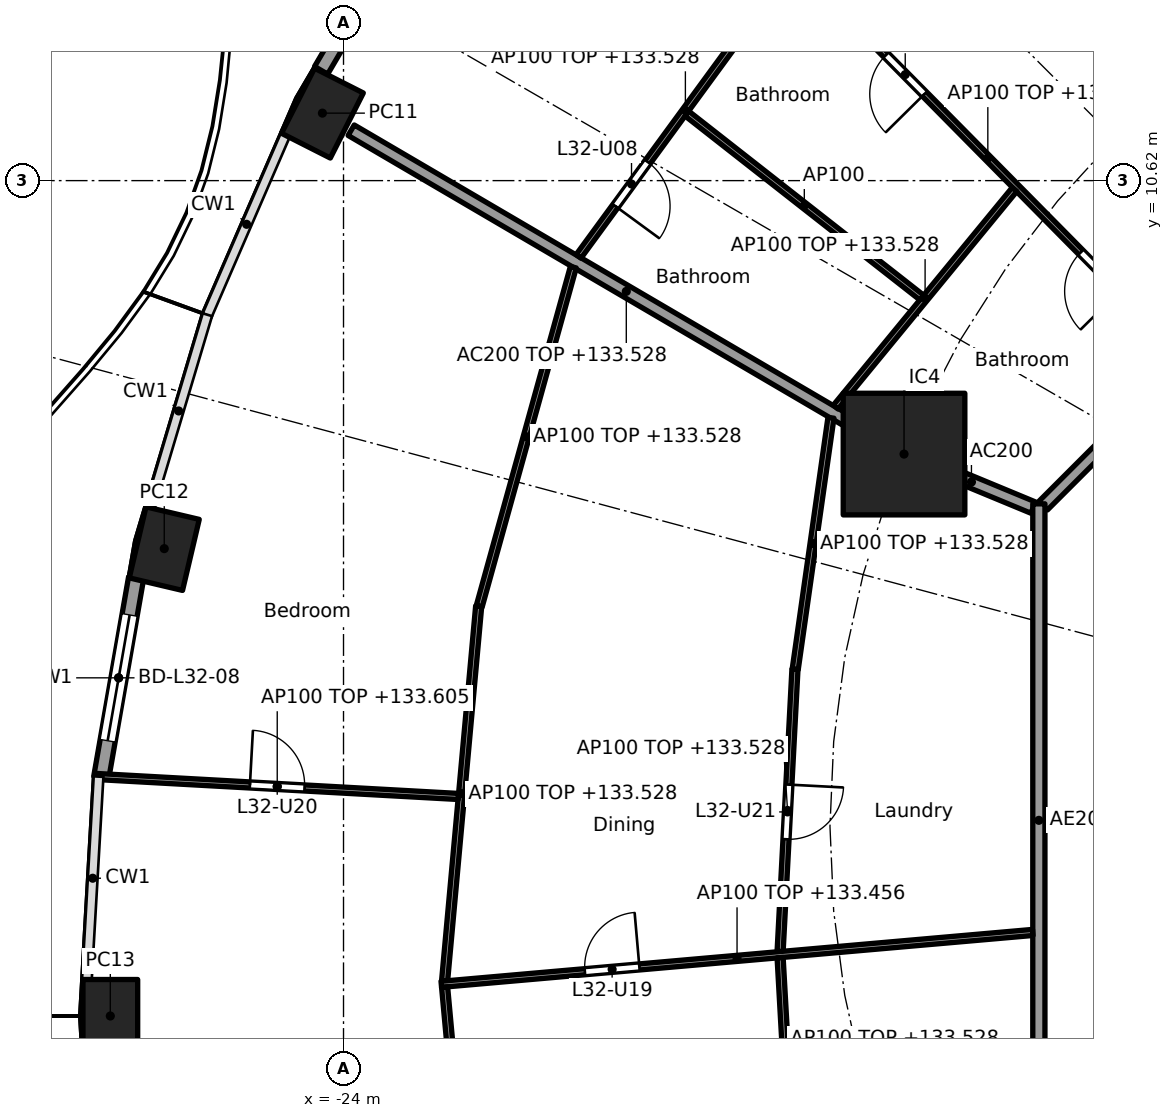
"""IFC4 building model, lengths in metres.
Left out: names, types, materials, properties, quantities, classifications, styles, units other than length and angle.
Written with IfcOpenShell. Run it as: python <this file> out.ifc"""

import sys

from ifc_helpers import new_model, si_unit, direction, frame, frame_2d, origin, origin_2d, place, context, subcontext, project, spatial, rectangle, hollow_rectangle, extrude, element, fill, save


model = new_model("IFC4")
c1 = context("Model", 3, precision=1e-05, world=origin(), true_north=direction((0.0, 1.0)))
c2 = subcontext(c1, "Body", "Model", "MODEL_VIEW")
j1 = project(units=[si_unit("LENGTHUNIT", "METRE"), si_unit("PLANEANGLEUNIT", "RADIAN")], contexts=[c1])
p1 = place(None, origin())
s1 = spatial("IfcSite", under=j1, at=p1, CompositionType="ELEMENT")
p2 = place(p1, origin())
s2 = spatial("IfcBuilding", under=s1, at=p2, CompositionType="ELEMENT")
p3 = place(p2, frame((0.0, 0.0, 130.7)))
s3 = spatial("IfcBuildingStorey", under=s2, at=p3, CompositionType="ELEMENT", Elevation=130.7)
for number, where, z_axis, x_axis in (
    (1, (-24.347, 11.73, 0.0), (0.0, 0.0, 1.0), (-0.452, -0.892, 0.0)),
    (2, (-26.948, 4.568, 0.0), (0.0, 0.0, 1.0), (-0.229, -0.973, 0.0)),
    (3, (-27.835, -3.118, 0.0), (0.0, 0.0, 1.0), (0.0, -1.0, 0.0)),
):
    element("IfcColumn", number, at=place(p3, frame(where, z_axis=z_axis, x_axis=x_axis)), inside=s3, PredefinedType="COLUMN", context=c2, shape_type="SweptSolid", body=[
        extrude(hollow_rectangle(XDim=1.2, YDim=0.9, WallThickness=0.04, at=origin_2d()), origin(), (0.0, 0.0, 1.0), 3.7),
    ])
p4 = place(p3, frame((-14.782, 6.123, 0.0), z_axis=(0.0, 0.0, 1.0), x_axis=(1.0, 0.0, 0.0)))
e4 = element("IfcColumn", 4, at=p4, inside=s3, PredefinedType="COLUMN", context=c2, shape_type="SweptSolid", body=[
    extrude(rectangle(XDim=2.0, YDim=2.0, at=origin_2d()), origin(), (0.0, 0.0, 1.0), 3.7),
])
p5 = place(p3, frame((-24.368, 12.434, 0.0), z_axis=(0.0, 0.0, 1.0), x_axis=(0.506314982873, 0.862348617508, 0.0)))
e5 = element("IfcWall", 5, at=p5, inside=s3, PredefinedType="SOLIDWALL", context=c2, shape_type="SweptSolid", body=[
    extrude(rectangle(XDim=3.208, YDim=0.25, at=frame_2d((1.604, 0.0))), origin(), (0.0, 0.0, 1.0), 3.44),
])
p6 = place(p5, frame((0.554, 0.0, 0.0)))
e6 = element("IfcOpeningElement", 6, at=p6, cuts=e5, PredefinedType="OPENING", context=c2, shape_type="SweptSolid", body=[
    extrude(rectangle(XDim=2.1, YDim=2.4, at=frame_2d((1.05, 1.2))), frame((0.0, 0.135, 0.0), z_axis=(0.0, -1.0, 0.0), x_axis=(1.0, 0.0, 0.0)), (0.0, 0.0, 1.0), 0.27),
])
p7 = place(p3, frame((-27.985, 0.802, 0.0), z_axis=(0.0, 0.0, 1.0), x_axis=(0.172163521006, 0.985068384446, 0.0)))
e7 = element("IfcWall", 7, at=p7, inside=s3, PredefinedType="SOLIDWALL", context=c2, shape_type="SweptSolid", body=[
    extrude(rectangle(XDim=3.333, YDim=0.25, at=frame_2d((1.666, 0.0))), origin(), (0.0, 0.0, 1.0), 3.44),
])
p8 = place(p7, frame((0.616, 0.0, 0.0)))
e8 = element("IfcOpeningElement", 8, at=p8, cuts=e7, PredefinedType="OPENING", context=c2, shape_type="SweptSolid", body=[
    extrude(rectangle(XDim=2.1, YDim=2.4, at=frame_2d((1.05, 1.2))), frame((0.0, 0.135, 0.0), z_axis=(0.0, -1.0, 0.0), x_axis=(1.0, 0.0, 0.0)), (0.0, 0.0, 1.0), 0.27),
])
p9 = place(p3, frame((-12.657, 5.243, 0.0), z_axis=(0.0, 0.0, 1.0), x_axis=(-0.923869415315, 0.382707856524, 0.0)))
e9 = element("IfcWall", 9, at=p9, inside=s3, PredefinedType="PARTITIONING", context=c2, shape_type="SweptSolid", body=[
    extrude(rectangle(XDim=2.2, YDim=0.2, at=frame_2d((1.1, 0.0))), origin(), (0.0, 0.0, 1.0), 3.44),
])
p10 = place(p3, frame((-14.825, 6.148, 0.0), z_axis=(0.0, 0.0, 1.0), x_axis=(-0.862852031662, 0.505456597006, 0.0)))
e10 = element("IfcWall", 10, at=p10, inside=s3, PredefinedType="PARTITIONING", context=c2, shape_type="SweptSolid", body=[
    extrude(rectangle(XDim=10.487, YDim=0.2, at=frame_2d((5.244, 0.0))), origin(), (0.0, 0.0, 1.0), 2.828),
])
p11 = place(p3, frame((-5.275, 12.494, 0.0), z_axis=(0.0, 0.0, 1.0), x_axis=(-0.707106781187, -0.707106781187, 0.0)))
e11 = element("IfcWall", 11, at=p11, inside=s3, PredefinedType="PARTITIONING", context=c2, shape_type="SweptSolid", body=[
    extrude(rectangle(XDim=10.209, YDim=0.2, at=frame_2d((5.104, 0.0))), origin(), (0.0, 0.0, 1.0), 3.44),
])
p12 = place(p11, frame((4.604, 0.0, 0.0)))
e12 = element("IfcOpeningElement", 12, at=p12, cuts=e11, PredefinedType="OPENING", context=c2, shape_type="SweptSolid", body=[
    extrude(rectangle(XDim=1.0, YDim=2.1, at=frame_2d((0.5, 1.05))), frame((0.0, 0.11, 0.0), z_axis=(0.0, -1.0, 0.0), x_axis=(1.0, 0.0, 0.0)), (0.0, 0.0, 1.0), 0.22),
])
p13 = place(p3, frame((-12.565, 5.304, 0.0), z_axis=(0.0, 0.0, 1.0), x_axis=(0.0, -1.0, 0.0)))
e13 = element("IfcWall", 13, at=p13, inside=s3, PredefinedType="PARTITIONING", context=c2, shape_type="SweptSolid", body=[
    extrude(rectangle(XDim=10.409, YDim=0.2, at=frame_2d((5.205, 0.0))), origin(), (0.0, 0.0, 1.0), 3.44),
])
p14 = place(p3, frame((-7.708, 10.198, 0.0), z_axis=(0.0, 0.0, 1.0), x_axis=(-0.497449462689, 0.867492957937, 0.0)))
e14 = element("IfcWall", 14, at=p14, inside=s3, PredefinedType="PARTITIONING", context=c2, shape_type="SweptSolid", body=[
    extrude(rectangle(XDim=9.185, YDim=0.1, at=frame_2d((4.592, 0.0))), origin(), (0.0, 0.0, 1.0), 2.756),
])
p15 = place(p14, frame((1.511, 0.0, 0.0)))
e15 = element("IfcOpeningElement", 15, at=p15, cuts=e14, PredefinedType="OPENING", context=c2, shape_type="SweptSolid", body=[
    extrude(rectangle(XDim=0.9, YDim=2.1, at=frame_2d((0.45, 1.05))), frame((0.0, 0.06, 0.0), z_axis=(0.0, -1.0, 0.0), x_axis=(1.0, 0.0, 0.0)), (0.0, 0.0, 1.0), 0.12),
])
p16 = place(p14, frame((6.078, 0.0, 0.0)))
e16 = element("IfcOpeningElement", 16, at=p16, cuts=e14, PredefinedType="OPENING", context=c2, shape_type="SweptSolid", body=[
    extrude(rectangle(XDim=0.9, YDim=2.1, at=frame_2d((0.45, 1.05))), frame((0.0, 0.06, 0.0), z_axis=(0.0, -1.0, 0.0), x_axis=(1.0, 0.0, 0.0)), (0.0, 0.0, 1.0), 0.12),
])
p17 = place(p3, frame((-10.182, 7.729, 0.0), z_axis=(0.0, 0.0, 1.0), x_axis=(-0.702927211734, 0.711261790766, 0.0)))
e17 = element("IfcWall", 17, at=p17, inside=s3, PredefinedType="PARTITIONING", context=c2, shape_type="SweptSolid", body=[
    extrude(rectangle(XDim=9.168, YDim=0.1, at=frame_2d((4.584, 0.0))), origin(), (0.0, 0.0, 1.0), 2.756),
])
p18 = place(p17, frame((1.507, 0.0, 0.0)))
e18 = element("IfcOpeningElement", 18, at=p18, cuts=e17, PredefinedType="OPENING", context=c2, shape_type="SweptSolid", body=[
    extrude(rectangle(XDim=0.9, YDim=2.1, at=frame_2d((0.45, 1.05))), frame((0.0, 0.06, 0.0), z_axis=(0.0, -1.0, 0.0), x_axis=(1.0, 0.0, 0.0)), (0.0, 0.0, 1.0), 0.12),
])
p19 = place(p17, frame((6.067, 0.0, 0.0)))
e19 = element("IfcOpeningElement", 19, at=p19, cuts=e17, PredefinedType="OPENING", context=c2, shape_type="SweptSolid", body=[
    extrude(rectangle(XDim=0.9, YDim=2.1, at=frame_2d((0.45, 1.05))), frame((0.0, 0.06, 0.0), z_axis=(0.0, -1.0, 0.0), x_axis=(1.0, 0.0, 0.0)), (0.0, 0.0, 1.0), 0.12),
])
p20 = place(p3, frame((-12.965, 10.475, 0.0), z_axis=(0.0, 0.0, 1.0), x_axis=(-0.634943961338, -0.772558195841, 0.0)))
e20 = element("IfcWall", 20, at=p20, inside=s3, PredefinedType="PARTITIONING", context=c2, shape_type="SweptSolid", body=[
    extrude(rectangle(XDim=4.632, YDim=0.1, at=frame_2d((2.316, 0.0))), origin(), (0.0, 0.0, 1.0), 2.828),
])
p21 = place(p3, frame((-16.621, 14.174, 0.0), z_axis=(0.0, 0.0, 1.0), x_axis=(-0.590674917338, -0.806909624449, 0.0)))
e21 = element("IfcWall", 21, at=p21, inside=s3, PredefinedType="PARTITIONING", context=c2, shape_type="SweptSolid", body=[
    extrude(rectangle(XDim=5.949, YDim=0.1, at=frame_2d((2.975, 0.0))), origin(), (0.0, 0.0, 1.0), 2.828),
])
p22 = place(p21, frame((4.024, 0.0, 0.0)))
e22 = element("IfcOpeningElement", 22, at=p22, cuts=e21, PredefinedType="OPENING", context=c2, shape_type="SweptSolid", body=[
    extrude(rectangle(XDim=0.9, YDim=2.1, at=frame_2d((0.45, 1.05))), frame((0.0, 0.06, 0.0), z_axis=(0.0, -1.0, 0.0), x_axis=(1.0, 0.0, 0.0)), (0.0, 0.0, 1.0), 0.12),
])
p23 = place(p3, frame((-14.491, 8.697, 0.0), z_axis=(0.0, 0.0, 1.0), x_axis=(-0.787139479951, 0.616775031193, 0.0)))
e23 = element("IfcWall", 23, at=p23, inside=s3, PredefinedType="PARTITIONING", context=c2, shape_type="SweptSolid", body=[
    extrude(rectangle(XDim=4.907, YDim=0.1, at=frame_2d((2.453, 0.0))), origin(), (0.0, 0.0, 1.0), 3.44),
])
p24 = place(p3, frame((-15.984, 6.72, 0.0), z_axis=(0.0, 0.0, 1.0), x_axis=(-0.140684869512, -0.990054426529, 0.0)))
e24 = element("IfcWall", 24, at=p24, inside=s3, PredefinedType="PARTITIONING", context=c2, shape_type="SweptSolid", body=[
    extrude(rectangle(XDim=4.177, YDim=0.1, at=frame_2d((2.088, 0.0))), origin(), (0.0, 0.0, 1.0), 2.828),
])
p25 = place(p3, frame((-20.221, 9.197, 0.0), z_axis=(0.0, 0.0, 1.0), x_axis=(-0.267398009191, -0.963586168789, 0.0)))
e25 = element("IfcWall", 25, at=p25, inside=s3, PredefinedType="PARTITIONING", context=c2, shape_type="SweptSolid", body=[
    extrude(rectangle(XDim=5.788, YDim=0.1, at=frame_2d((2.894, 0.0))), origin(), (0.0, 0.0, 1.0), 2.828),
])
p26 = place(p3, frame((-16.576, 2.585, 0.0), z_axis=(0.0, 0.0, 1.0), x_axis=(-0.052509224895, -0.998620439056, 0.0)))
e26 = element("IfcWall", 26, at=p26, inside=s3, PredefinedType="PARTITIONING", context=c2, shape_type="SweptSolid", body=[
    extrude(rectangle(XDim=4.649, YDim=0.1, at=frame_2d((2.325, 0.0))), origin(), (0.0, 0.0, 1.0), 2.828),
])
p27 = place(p26, frame((1.9, 0.0, 0.0)))
e27 = element("IfcOpeningElement", 27, at=p27, cuts=e26, PredefinedType="OPENING", context=c2, shape_type="SweptSolid", body=[
    extrude(rectangle(XDim=0.9, YDim=2.1, at=frame_2d((0.45, 1.05))), frame((0.0, 0.06, 0.0), z_axis=(0.0, -1.0, 0.0), x_axis=(1.0, 0.0, 0.0)), (0.0, 0.0, 1.0), 0.12),
])
p28 = place(p3, frame((-21.777, 3.621, 0.0), z_axis=(0.0, 0.0, 1.0), x_axis=(-0.090606877484, -0.995886737412, 0.0)))
e28 = element("IfcWall", 28, at=p28, inside=s3, PredefinedType="PARTITIONING", context=c2, shape_type="SweptSolid", body=[
    extrude(rectangle(XDim=6.189, YDim=0.1, at=frame_2d((3.095, 0.0))), origin(), (0.0, 0.0, 1.0), 2.828),
])
p29 = place(p3, frame((-22.112, 0.492, 0.0), z_axis=(0.0, 0.0, 1.0), x_axis=(-0.998479185151, 0.055129999278, 0.0)))
e29 = element("IfcWall", 29, at=p29, inside=s3, PredefinedType="PARTITIONING", context=c2, shape_type="SweptSolid", body=[
    extrude(rectangle(XDim=5.965, YDim=0.1, at=frame_2d((2.982, 0.0))), origin(), (0.0, 0.0, 1.0), 2.905),
])
p30 = place(p29, frame((2.533, 0.0, 0.0)))
e30 = element("IfcOpeningElement", 30, at=p30, cuts=e29, PredefinedType="OPENING", context=c2, shape_type="SweptSolid", body=[
    extrude(rectangle(XDim=0.9, YDim=2.1, at=frame_2d((0.45, 1.05))), frame((0.0, 0.06, 0.0), z_axis=(0.0, -1.0, 0.0), x_axis=(1.0, 0.0, 0.0)), (0.0, 0.0, 1.0), 0.12),
])
p31 = place(p3, frame((-12.664, -1.744, 0.0), z_axis=(0.0, 0.0, 1.0), x_axis=(-0.99617728169, -0.087354584571, 0.0)))
e31 = element("IfcWall", 31, at=p31, inside=s3, PredefinedType="PARTITIONING", context=c2, shape_type="SweptSolid", body=[
    extrude(rectangle(XDim=9.765, YDim=0.1, at=frame_2d((4.883, 0.0))), origin(), (0.0, 0.0, 1.0), 2.756),
])
p32 = place(p31, frame((6.495, 0.0, 0.0)))
e32 = element("IfcOpeningElement", 32, at=p32, cuts=e31, PredefinedType="OPENING", context=c2, shape_type="SweptSolid", body=[
    extrude(rectangle(XDim=0.9, YDim=2.1, at=frame_2d((0.45, 1.05))), frame((0.0, 0.06, 0.0), z_axis=(0.0, -1.0, 0.0), x_axis=(1.0, 0.0, 0.0)), (0.0, 0.0, 1.0), 0.12),
])
p33 = place(p3, frame((-16.82, -2.158, 0.0), z_axis=(0.0, 0.0, 1.0), x_axis=(0.055967931845, -0.998432566879, 0.0)))
e33 = element("IfcWall", 33, at=p33, inside=s3, PredefinedType="PARTITIONING", context=c2, shape_type="SweptSolid", body=[
    extrude(rectangle(XDim=4.698, YDim=0.1, at=frame_2d((2.349, 0.0))), origin(), (0.0, 0.0, 1.0), 2.828),
])
p34 = place(p33, frame((1.874, 0.0, 0.0)))
e34 = element("IfcOpeningElement", 34, at=p34, cuts=e33, PredefinedType="OPENING", context=c2, shape_type="SweptSolid", body=[
    extrude(rectangle(XDim=0.9, YDim=2.1, at=frame_2d((0.45, 1.05))), frame((0.0, 0.06, 0.0), z_axis=(0.0, -1.0, 0.0), x_axis=(1.0, 0.0, 0.0)), (0.0, 0.0, 1.0), 0.12),
])
p35 = place(p3, frame((-22.338, -2.642, 0.0), z_axis=(0.0, 0.0, 1.0), x_axis=(0.091768304523, -0.995780386574, 0.0)))
e35 = element("IfcWall", 35, at=p35, inside=s3, PredefinedType="PARTITIONING", context=c2, shape_type="SweptSolid", body=[
    extrude(rectangle(XDim=6.215, YDim=0.1, at=frame_2d((3.107, 0.0))), origin(), (0.0, 0.0, 1.0), 2.828),
])
p36 = place(p35, frame((2.632, 0.0, 0.0)))
e36 = element("IfcOpeningElement", 36, at=p36, cuts=e35, PredefinedType="OPENING", context=c2, shape_type="SweptSolid", body=[
    extrude(rectangle(XDim=0.9, YDim=2.1, at=frame_2d((0.45, 1.05))), frame((0.0, 0.06, 0.0), z_axis=(0.0, -1.0, 0.0), x_axis=(1.0, 0.0, 0.0)), (0.0, 0.0, 1.0), 0.12),
])
p37 = place(p8, origin())
e37 = element("IfcDoor", 37, at=p37, inside=s3, OperationType="SLIDING_TO_LEFT", PredefinedType="DOOR", context=c2, shape_type="SweptSolid", body=[
    extrude(rectangle(XDim=2.1, YDim=2.4, at=frame_2d((1.05, 1.2))), frame((0.0, 0.025, 0.0), z_axis=(0.0, -1.0, 0.0), x_axis=(1.0, 0.0, 0.0)), (0.0, 0.0, 1.0), 0.05),
])
fill(e8, e37)
p38 = place(p18, origin())
e38 = element("IfcDoor", 38, at=p38, inside=s3, OperationType="SINGLE_SWING_LEFT", PredefinedType="DOOR", context=c2, shape_type="SweptSolid", body=[
    extrude(rectangle(XDim=0.9, YDim=2.1, at=frame_2d((0.45, 1.05))), frame((0.0, 0.025, 0.0), z_axis=(0.0, -1.0, 0.0), x_axis=(1.0, 0.0, 0.0)), (0.0, 0.0, 1.0), 0.05),
])
fill(e18, e38)
p39 = place(p19, origin())
e39 = element("IfcDoor", 39, at=p39, inside=s3, OperationType="SINGLE_SWING_LEFT", PredefinedType="DOOR", context=c2, shape_type="SweptSolid", body=[
    extrude(rectangle(XDim=0.9, YDim=2.1, at=frame_2d((0.45, 1.05))), frame((0.0, 0.025, 0.0), z_axis=(0.0, -1.0, 0.0), x_axis=(1.0, 0.0, 0.0)), (0.0, 0.0, 1.0), 0.05),
])
fill(e19, e39)
p40 = place(p22, origin())
e40 = element("IfcDoor", 40, at=p40, inside=s3, OperationType="SINGLE_SWING_RIGHT", PredefinedType="DOOR", context=c2, shape_type="SweptSolid", body=[
    extrude(rectangle(XDim=0.9, YDim=2.1, at=frame_2d((0.45, 1.05))), frame((0.0, 0.025, 0.0), z_axis=(0.0, -1.0, 0.0), x_axis=(1.0, 0.0, 0.0)), (0.0, 0.0, 1.0), 0.05),
])
fill(e22, e40)
p41 = place(p32, frame((0.9, 0.0, 0.0), x_axis=(-1.0, 0.0, 0.0)))
e41 = element("IfcDoor", 41, at=p41, inside=s3, OperationType="SINGLE_SWING_RIGHT", PredefinedType="DOOR", context=c2, shape_type="SweptSolid", body=[
    extrude(rectangle(XDim=0.9, YDim=2.1, at=frame_2d((0.45, 1.05))), frame((0.0, 0.025, 0.0), z_axis=(0.0, -1.0, 0.0), x_axis=(1.0, 0.0, 0.0)), (0.0, 0.0, 1.0), 0.05),
])
fill(e32, e41)
p42 = place(p30, frame((0.9, 0.0, 0.0), x_axis=(-1.0, 0.0, 0.0)))
e42 = element("IfcDoor", 42, at=p42, inside=s3, OperationType="SINGLE_SWING_LEFT", PredefinedType="DOOR", context=c2, shape_type="SweptSolid", body=[
    extrude(rectangle(XDim=0.9, YDim=2.1, at=frame_2d((0.45, 1.05))), frame((0.0, 0.025, 0.0), z_axis=(0.0, -1.0, 0.0), x_axis=(1.0, 0.0, 0.0)), (0.0, 0.0, 1.0), 0.05),
])
fill(e30, e42)
p43 = place(p27, origin())
e43 = element("IfcDoor", 43, at=p43, inside=s3, OperationType="SINGLE_SWING_LEFT", PredefinedType="DOOR", context=c2, shape_type="SweptSolid", body=[
    extrude(rectangle(XDim=0.9, YDim=2.1, at=frame_2d((0.45, 1.05))), frame((0.0, 0.025, 0.0), z_axis=(0.0, -1.0, 0.0), x_axis=(1.0, 0.0, 0.0)), (0.0, 0.0, 1.0), 0.05),
])
fill(e27, e43)
save(model, sys.argv[1])
